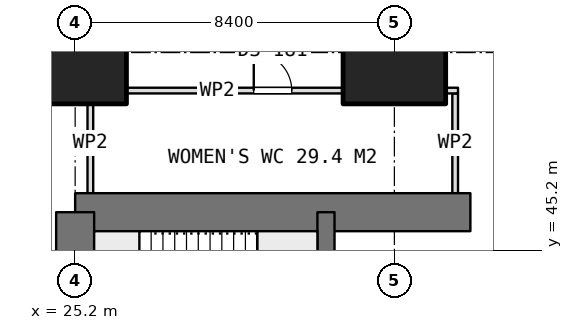
"""IFC4 building model, lengths in metres.
Left out: names, types, materials, properties, quantities, classifications, styles, units other than length and angle.
Written with IfcOpenShell. Run it as: python <this file> out.ifc"""

import sys

from ifc_helpers import new_model, si_unit, direction, frame, frame_2d, origin, origin_2d, place, context, subcontext, project, spatial, rectangle, extrude, element, fill, save


model = new_model("IFC4")
c1 = context("Model", 3, precision=1e-05, world=origin(), true_north=direction((0.0, 1.0)))
c2 = subcontext(c1, "Body", "Model", "MODEL_VIEW")
j1 = project(units=[si_unit("LENGTHUNIT", "METRE"), si_unit("PLANEANGLEUNIT", "RADIAN")], contexts=[c1])
p1 = place(None, origin())
s1 = spatial("IfcSite", under=j1, at=p1, CompositionType="ELEMENT")
p2 = place(p1, origin())
s2 = spatial("IfcBuilding", under=s1, at=p2, CompositionType="ELEMENT")
p3 = place(p2, frame((0.0, 0.0, 172.7)))
s3 = spatial("IfcBuildingStorey", under=s2, at=p3, CompositionType="ELEMENT", Elevation=172.7)
p4 = place(p3, frame((25.2, 46.2, 0.0), z_axis=(0.0, 0.0, 1.0), x_axis=(1.0, 0.0, 0.0)))
e1 = element("IfcWall", 1, at=p4, inside=s3, PredefinedType="SHEAR", context=c2, shape_type="SweptSolid", body=[
    extrude(rectangle(XDim=10.4, YDim=1.0, at=frame_2d((5.2, 0.0))), origin(), (0.0, 0.0, 1.0), 3.75),
])
p5 = place(p3, frame((25.2, 21.0, 0.0), z_axis=(0.0, 0.0, 1.0), x_axis=(0.0, 1.0, 0.0)))
e2 = element("IfcWall", 2, at=p5, inside=s3, PredefinedType="SHEAR", context=c2, shape_type="SweptSolid", body=[
    extrude(rectangle(XDim=25.2, YDim=1.0, at=frame_2d((12.6, 0.0))), origin(), (0.0, 0.0, 1.0), 3.75),
])
p6 = place(p5, frame((7.8, 0.0, 0.0)))
e3 = element("IfcOpeningElement", 3, at=p6, cuts=e2, PredefinedType="OPENING", context=c2, shape_type="SweptSolid", body=[
    extrude(rectangle(XDim=1.2, YDim=2.1, at=frame_2d((0.6, 1.05))), frame((0.0, 0.51, 0.0), z_axis=(0.0, -1.0, 0.0), x_axis=(1.0, 0.0, 0.0)), (0.0, 0.0, 1.0), 1.02),
])
p7 = place(p5, frame((14.25, 0.0, 0.0)))
e4 = element("IfcOpeningElement", 4, at=p7, cuts=e2, PredefinedType="OPENING", context=c2, shape_type="SweptSolid", body=[
    extrude(rectangle(XDim=0.9, YDim=2.1, at=frame_2d((0.45, 1.05))), frame((0.0, 0.51, 0.0), z_axis=(0.0, -1.0, 0.0), x_axis=(1.0, 0.0, 0.0)), (0.0, 0.0, 1.0), 1.02),
])
p8 = place(p5, frame((16.85, 0.0, 0.0)))
e5 = element("IfcOpeningElement", 5, at=p8, cuts=e2, PredefinedType="OPENING", context=c2, shape_type="SweptSolid", body=[
    extrude(rectangle(XDim=0.9, YDim=2.1, at=frame_2d((0.45, 1.05))), frame((0.0, 0.51, 0.0), z_axis=(0.0, -1.0, 0.0), x_axis=(1.0, 0.0, 0.0)), (0.0, 0.0, 1.0), 1.02),
])
p9 = place(p5, frame((19.025, 0.0, 0.0)))
e6 = element("IfcOpeningElement", 6, at=p9, cuts=e2, PredefinedType="OPENING", context=c2, shape_type="SweptSolid", body=[
    extrude(rectangle(XDim=1.2, YDim=2.1, at=frame_2d((0.6, 1.05))), frame((0.0, 0.51, 0.0), z_axis=(0.0, -1.0, 0.0), x_axis=(1.0, 0.0, 0.0)), (0.0, 0.0, 1.0), 1.02),
])
p10 = place(p3, frame((31.8, 21.0, 0.0), z_axis=(0.0, 0.0, 1.0), x_axis=(0.0, 1.0, 0.0)))
e7 = element("IfcWall", 7, at=p10, inside=s3, PredefinedType="SHEAR", context=c2, shape_type="SweptSolid", body=[
    extrude(rectangle(XDim=25.2, YDim=0.45, at=frame_2d((12.6, 0.0))), origin(), (0.0, 0.0, 1.0), 3.75),
])
for number, where, z_axis, x_axis in (
    (8, (25.2, 50.4, 0.0), (0.0, 0.0, 1.0), (1.0, 0.0, 0.0)),
    (9, (33.6, 50.4, 0.0), (0.0, 0.0, 1.0), (1.0, 0.0, 0.0)),
):
    element("IfcColumn", number, at=place(p3, frame(where, z_axis=z_axis, x_axis=x_axis)), inside=s3, PredefinedType="COLUMN", context=c2, shape_type="SweptSolid", body=[
        extrude(rectangle(XDim=2.7, YDim=2.7, at=origin_2d()), origin(), (0.0, 0.0, 1.0), 3.75),
    ])
p11 = place(p3, frame((25.525, 49.4, 0.0), z_axis=(0.0, 0.0, 1.0), x_axis=(1.0, 0.0, 0.0)))
e10 = element("IfcWall", 10, at=p11, inside=s3, PredefinedType="PARTITIONING", context=c2, shape_type="SweptSolid", body=[
    extrude(rectangle(XDim=9.75, YDim=0.15, at=frame_2d((4.875, 0.0))), origin(), (0.0, 0.0, 1.0), 3.5),
])
p12 = place(p11, frame((4.375, 0.0, 0.0)))
e11 = element("IfcOpeningElement", 11, at=p12, cuts=e10, PredefinedType="OPENING", context=c2, shape_type="SweptSolid", body=[
    extrude(rectangle(XDim=1.0, YDim=2.1, at=frame_2d((0.5, 1.05))), frame((0.0, 0.085, 0.0), z_axis=(0.0, -1.0, 0.0), x_axis=(1.0, 0.0, 0.0)), (0.0, 0.0, 1.0), 0.17),
])
for number, where, z_axis, x_axis in (
    (12, (25.6, 46.7, 0.0), (0.0, 0.0, 1.0), (0.0, 1.0, 0.0)),
    (13, (35.2, 46.7, 0.0), (0.0, 0.0, 1.0), (0.0, 1.0, 0.0)),
):
    element("IfcWall", number, at=place(p3, frame(where, z_axis=z_axis, x_axis=x_axis)), inside=s3, PredefinedType="PARTITIONING", context=c2, shape_type="SweptSolid", body=[
        extrude(rectangle(XDim=2.625, YDim=0.15, at=frame_2d((1.312, 0.0))), origin(), (0.0, 0.0, 1.0), 3.5),
    ])
p13 = place(p12, origin())
e14 = element("IfcDoor", 14, at=p13, inside=s3, OperationType="SINGLE_SWING_LEFT", PredefinedType="DOOR", context=c2, shape_type="SweptSolid", body=[
    extrude(rectangle(XDim=1.0, YDim=2.1, at=frame_2d((0.5, 1.05))), frame((0.0, 0.025, 0.0), z_axis=(0.0, -1.0, 0.0), x_axis=(1.0, 0.0, 0.0)), (0.0, 0.0, 1.0), 0.05),
])
fill(e11, e14)
save(model, sys.argv[1])
